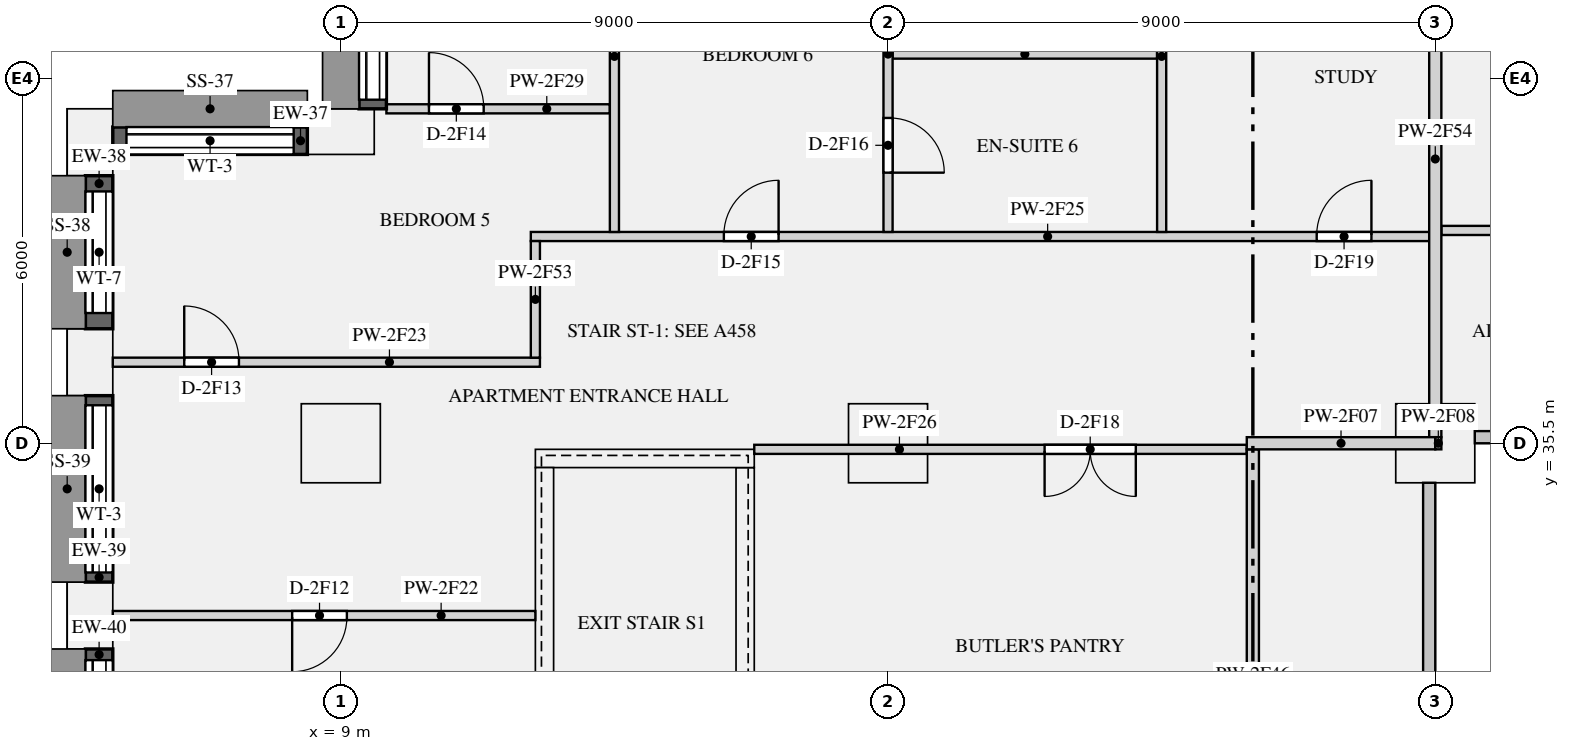
"""IFC4 building model, lengths in metres.
Left out: names, types, materials, properties, quantities, classifications, styles, units other than length and angle.
Written with IfcOpenShell. Run it as: python <this file> out.ifc"""

import sys

from ifc_helpers import new_model, si_unit, direction, frame, frame_2d, origin, origin_2d, place, context, subcontext, project, spatial, rectangle, extrude, element, fill, save


model = new_model("IFC4")
c1 = context("Model", 3, precision=1e-05, world=origin(), true_north=direction((0.0, 1.0)))
c2 = subcontext(c1, "Body", "Model", "MODEL_VIEW")
j1 = project(units=[si_unit("LENGTHUNIT", "METRE"), si_unit("PLANEANGLEUNIT", "RADIAN")], contexts=[c1])
p1 = place(None, origin())
s1 = spatial("IfcSite", under=j1, at=p1, CompositionType="ELEMENT")
p2 = place(p1, origin())
s2 = spatial("IfcBuilding", under=s1, at=p2, CompositionType="ELEMENT")
p3 = place(p2, frame((0.0, 0.0, 124.5)))
s3 = spatial("IfcBuildingStorey", under=s2, at=p3, CompositionType="ELEMENT", Elevation=124.5)
for number, where, z_axis, x_axis in (
    (1, (9.0, 40.625, 0.0), (0.0, 0.0, 1.0), (-1.0, 0.0, 0.0)),
    (2, (4.875, 40.45, 0.0), (0.0, 0.0, 1.0), (0.0, -1.0, 0.0)),
    (3, (4.875, 36.833, 0.0), (0.0, 0.0, 1.0), (0.0, -1.0, 0.0)),
    (4, (4.875, 32.667, 0.0), (0.0, 0.0, 1.0), (0.0, -1.0, 0.0)),
):
    element("IfcColumn", number, at=place(p3, frame(where, z_axis=z_axis, x_axis=x_axis)), inside=s3, PredefinedType="USERDEFINED", context=c2, shape_type="SweptSolid", body=[
        extrude(rectangle(XDim=1.1, YDim=0.75, at=origin_2d()), origin(), (0.0, 0.0, 1.0), 3.15),
    ])
for number, where, z_axis, x_axis in (
    (5, (9.0, 35.5, 0.0), (0.0, 0.0, 1.0), (1.0, 0.0, 0.0)),
    (6, (18.0, 35.5, 0.0), (0.0, 0.0, 1.0), (1.0, 0.0, 0.0)),
    (7, (27.0, 35.5, 0.0), (0.0, 0.0, 1.0), (1.0, 0.0, 0.0)),
):
    element("IfcColumn", number, at=place(p3, frame(where, z_axis=z_axis, x_axis=x_axis)), inside=s3, PredefinedType="COLUMN", context=c2, shape_type="SweptSolid", body=[
        extrude(rectangle(XDim=1.3, YDim=1.3, at=origin_2d()), origin(), (0.0, 0.0, 1.0), 3.15),
    ])
p4 = place(p3, frame((12.2, 35.25, 0.0), z_axis=(0.0, 0.0, 1.0), x_axis=(1.0, 0.0, 0.0)))
e8 = element("IfcWall", 8, at=p4, inside=s3, PredefinedType="SHEAR", context=c2, shape_type="SweptSolid", body=[
    extrude(rectangle(XDim=3.6, YDim=0.3, at=frame_2d((1.8, 0.0))), origin(), (0.0, 0.0, 1.0), 3.15),
])
for number, where, z_axis, x_axis in (
    (9, (12.35, 27.3, 0.0), (0.0, 0.0, 1.0), (0.0, 1.0, 0.0)),
    (10, (15.65, 27.3, 0.0), (0.0, 0.0, 1.0), (0.0, 1.0, 0.0)),
):
    element("IfcWall", number, at=place(p3, frame(where, z_axis=z_axis, x_axis=x_axis)), inside=s3, PredefinedType="SHEAR", context=c2, shape_type="SweptSolid", body=[
        extrude(rectangle(XDim=7.8, YDim=0.3, at=frame_2d((3.9, 0.0))), origin(), (0.0, 0.0, 1.0), 3.15),
    ])
p5 = place(p3, frame((9.525, 44.4, 0.9), z_axis=(0.0, 0.0, 1.0), x_axis=(0.0, -1.0, 0.0)))
e11 = element("IfcWall", 11, at=p5, inside=s3, PredefinedType="SOLIDWALL", context=c2, shape_type="SweptSolid", body=[
    extrude(rectangle(XDim=3.4, YDim=0.45, at=frame_2d((1.7, 0.0))), origin(), (0.0, 0.0, 1.0), 1.93),
])
p6 = place(p5, frame((0.15, 0.0, 0.15)))
e12 = element("IfcOpeningElement", 12, at=p6, cuts=e11, PredefinedType="OPENING", context=c2, shape_type="SweptSolid", body=[
    extrude(rectangle(XDim=3.1, YDim=1.5, at=frame_2d((1.55, 0.75))), frame((0.0, 0.235, 0.0), z_axis=(0.0, -1.0, 0.0), x_axis=(1.0, 0.0, 0.0)), (0.0, 0.0, 1.0), 0.47),
])
p7 = place(p3, frame((8.45, 40.475, 0.9), z_axis=(0.0, 0.0, 1.0), x_axis=(-1.0, 0.0, 0.0)))
e13 = element("IfcWall", 13, at=p7, inside=s3, PredefinedType="SOLIDWALL", context=c2, shape_type="SweptSolid", body=[
    extrude(rectangle(XDim=3.2, YDim=0.45, at=frame_2d((1.6, 0.0))), origin(), (0.0, 0.0, 1.0), 1.93),
])
p8 = place(p7, frame((0.225, 0.0, 0.15)))
e14 = element("IfcOpeningElement", 14, at=p8, cuts=e13, PredefinedType="OPENING", context=c2, shape_type="SweptSolid", body=[
    extrude(rectangle(XDim=2.75, YDim=1.5, at=frame_2d((1.375, 0.75))), frame((0.0, 0.235, 0.0), z_axis=(0.0, -1.0, 0.0), x_axis=(1.0, 0.0, 0.0)), (0.0, 0.0, 1.0), 0.47),
])
p9 = place(p3, frame((5.025, 39.9, 0.9), z_axis=(0.0, 0.0, 1.0), x_axis=(0.0, -1.0, 0.0)))
e15 = element("IfcWall", 15, at=p9, inside=s3, PredefinedType="SOLIDWALL", context=c2, shape_type="SweptSolid", body=[
    extrude(rectangle(XDim=2.517, YDim=0.45, at=frame_2d((1.258, 0.0))), origin(), (0.0, 0.0, 1.0), 1.93),
])
p10 = place(p9, frame((0.259, 0.0, 0.15)))
e16 = element("IfcOpeningElement", 16, at=p10, cuts=e15, PredefinedType="OPENING", context=c2, shape_type="SweptSolid", body=[
    extrude(rectangle(XDim=2.0, YDim=1.5, at=frame_2d((1.0, 0.75))), frame((0.0, 0.235, 0.0), z_axis=(0.0, -1.0, 0.0), x_axis=(1.0, 0.0, 0.0)), (0.0, 0.0, 1.0), 0.47),
])
p11 = place(p3, frame((5.025, 36.283, 0.9), z_axis=(0.0, 0.0, 1.0), x_axis=(0.0, -1.0, 0.0)))
e17 = element("IfcWall", 17, at=p11, inside=s3, PredefinedType="SOLIDWALL", context=c2, shape_type="SweptSolid", body=[
    extrude(rectangle(XDim=3.066, YDim=0.45, at=frame_2d((1.533, 0.0))), origin(), (0.0, 0.0, 1.0), 1.93),
])
p12 = place(p11, frame((0.158, 0.0, 0.15)))
e18 = element("IfcOpeningElement", 18, at=p12, cuts=e17, PredefinedType="OPENING", context=c2, shape_type="SweptSolid", body=[
    extrude(rectangle(XDim=2.75, YDim=1.5, at=frame_2d((1.375, 0.75))), frame((0.0, 0.235, 0.0), z_axis=(0.0, -1.0, 0.0), x_axis=(1.0, 0.0, 0.0)), (0.0, 0.0, 1.0), 0.47),
])
p13 = place(p3, frame((5.025, 32.117, 0.9), z_axis=(0.0, 0.0, 1.0), x_axis=(0.0, -1.0, 0.0)))
e19 = element("IfcWall", 19, at=p13, inside=s3, PredefinedType="SOLIDWALL", context=c2, shape_type="SweptSolid", body=[
    extrude(rectangle(XDim=2.867, YDim=0.45, at=frame_2d((1.434, 0.0))), origin(), (0.0, 0.0, 1.0), 1.93),
])
p14 = place(p13, frame((0.184, 0.0, 0.15)))
e20 = element("IfcOpeningElement", 20, at=p14, cuts=e19, PredefinedType="OPENING", context=c2, shape_type="SweptSolid", body=[
    extrude(rectangle(XDim=2.5, YDim=1.5, at=frame_2d((1.25, 0.75))), frame((0.0, 0.235, 0.0), z_axis=(0.0, -1.0, 0.0), x_axis=(1.0, 0.0, 0.0)), (0.0, 0.0, 1.0), 0.47),
])
p15 = place(p3, frame((23.9, 35.5, 0.0), z_axis=(0.0, 0.0, 1.0), x_axis=(1.0, 0.0, 0.0)))
e21 = element("IfcWall", 21, at=p15, inside=s3, PredefinedType="PARTITIONING", context=c2, shape_type="SweptSolid", body=[
    extrude(rectangle(XDim=3.1, YDim=0.2, at=frame_2d((1.55, 0.0))), origin(), (0.0, 0.0, 1.0), 2.83),
])
p16 = place(p3, frame((27.0, 35.5, 0.0), z_axis=(0.0, 0.0, 1.0), x_axis=(1.0, 0.0, 0.0)))
e22 = element("IfcWall", 22, at=p16, inside=s3, PredefinedType="PARTITIONING", context=c2, shape_type="SweptSolid", body=[
    extrude(rectangle(XDim=0.1, YDim=0.2, at=frame_2d((0.05, 0.0))), origin(), (0.0, 0.0, 1.0), 2.83),
])
p17 = place(p3, frame((5.25, 32.667, 0.0), z_axis=(0.0, 0.0, 1.0), x_axis=(1.0, 0.0, 0.0)))
e23 = element("IfcWall", 23, at=p17, inside=s3, PredefinedType="PARTITIONING", context=c2, shape_type="SweptSolid", body=[
    extrude(rectangle(XDim=6.95, YDim=0.15, at=frame_2d((3.475, 0.0))), origin(), (0.0, 0.0, 1.0), 2.83),
])
p18 = place(p17, frame((2.95, 0.0, 0.0)))
e24 = element("IfcOpeningElement", 24, at=p18, cuts=e23, PredefinedType="OPENING", context=c2, shape_type="SweptSolid", body=[
    extrude(rectangle(XDim=0.9, YDim=2.1, at=frame_2d((0.45, 1.05))), frame((0.0, 0.085, 0.0), z_axis=(0.0, -1.0, 0.0), x_axis=(1.0, 0.0, 0.0)), (0.0, 0.0, 1.0), 0.17),
])
p19 = place(p3, frame((5.25, 36.833, 0.0), z_axis=(0.0, 0.0, 1.0), x_axis=(1.0, 0.0, 0.0)))
e25 = element("IfcWall", 25, at=p19, inside=s3, PredefinedType="PARTITIONING", context=c2, shape_type="SweptSolid", body=[
    extrude(rectangle(XDim=7.025, YDim=0.15, at=frame_2d((3.512, 0.0))), origin(), (0.0, 0.0, 1.0), 2.83),
])
p20 = place(p19, frame((1.175, 0.0, 0.0)))
e26 = element("IfcOpeningElement", 26, at=p20, cuts=e25, PredefinedType="OPENING", context=c2, shape_type="SweptSolid", body=[
    extrude(rectangle(XDim=0.9, YDim=2.1, at=frame_2d((0.45, 1.05))), frame((0.0, 0.085, 0.0), z_axis=(0.0, -1.0, 0.0), x_axis=(1.0, 0.0, 0.0)), (0.0, 0.0, 1.0), 0.17),
])
p21 = place(p3, frame((12.125, 38.9, 0.0), z_axis=(0.0, 0.0, 1.0), x_axis=(1.0, 0.0, 0.0)))
e27 = element("IfcWall", 27, at=p21, inside=s3, PredefinedType="PARTITIONING", context=c2, shape_type="SweptSolid", body=[
    extrude(rectangle(XDim=14.775, YDim=0.15, at=frame_2d((7.387, 0.0))), origin(), (0.0, 0.0, 1.0), 2.83),
])
p22 = place(p21, frame((3.175, 0.0, 0.0)))
e28 = element("IfcOpeningElement", 28, at=p22, cuts=e27, PredefinedType="OPENING", context=c2, shape_type="SweptSolid", body=[
    extrude(rectangle(XDim=0.9, YDim=2.1, at=frame_2d((0.45, 1.05))), frame((0.0, 0.085, 0.0), z_axis=(0.0, -1.0, 0.0), x_axis=(1.0, 0.0, 0.0)), (0.0, 0.0, 1.0), 0.17),
])
p23 = place(p21, frame((12.925, 0.0, 0.0)))
e29 = element("IfcOpeningElement", 29, at=p23, cuts=e27, PredefinedType="OPENING", context=c2, shape_type="SweptSolid", body=[
    extrude(rectangle(XDim=0.9, YDim=2.1, at=frame_2d((0.45, 1.05))), frame((0.0, 0.085, 0.0), z_axis=(0.0, -1.0, 0.0), x_axis=(1.0, 0.0, 0.0)), (0.0, 0.0, 1.0), 0.17),
])
p24 = place(p3, frame((15.8, 35.4, 0.0), z_axis=(0.0, 0.0, 1.0), x_axis=(1.0, 0.0, 0.0)))
e30 = element("IfcWall", 30, at=p24, inside=s3, PredefinedType="PARTITIONING", context=c2, shape_type="SweptSolid", body=[
    extrude(rectangle(XDim=8.1, YDim=0.15, at=frame_2d((4.05, 0.0))), origin(), (0.0, 0.0, 1.0), 2.83),
])
p25 = place(p24, frame((4.775, 0.0, 0.0)))
e31 = element("IfcOpeningElement", 31, at=p25, cuts=e30, PredefinedType="OPENING", context=c2, shape_type="SweptSolid", body=[
    extrude(rectangle(XDim=1.5, YDim=2.1, at=frame_2d((0.75, 1.05))), frame((0.0, 0.085, 0.0), z_axis=(0.0, -1.0, 0.0), x_axis=(1.0, 0.0, 0.0)), (0.0, 0.0, 1.0), 0.17),
])
p26 = place(p3, frame((9.75, 41.0, 0.0), z_axis=(0.0, 0.0, 1.0), x_axis=(1.0, 0.0, 0.0)))
e32 = element("IfcWall", 32, at=p26, inside=s3, PredefinedType="PARTITIONING", context=c2, shape_type="SweptSolid", body=[
    extrude(rectangle(XDim=3.675, YDim=0.15, at=frame_2d((1.837, 0.0))), origin(), (0.0, 0.0, 1.0), 2.83),
])
p27 = place(p26, frame((0.7, 0.0, 0.0)))
e33 = element("IfcOpeningElement", 33, at=p27, cuts=e32, PredefinedType="OPENING", context=c2, shape_type="SweptSolid", body=[
    extrude(rectangle(XDim=0.9, YDim=2.1, at=frame_2d((0.45, 1.05))), frame((0.0, 0.085, 0.0), z_axis=(0.0, -1.0, 0.0), x_axis=(1.0, 0.0, 0.0)), (0.0, 0.0, 1.0), 0.17),
])
p28 = place(p3, frame((18.075, 41.9, 0.0), z_axis=(0.0, 0.0, 1.0), x_axis=(1.0, 0.0, 0.0)))
e34 = element("IfcWall", 34, at=p28, inside=s3, PredefinedType="PARTITIONING", context=c2, shape_type="SweptSolid", body=[
    extrude(rectangle(XDim=4.35, YDim=0.15, at=frame_2d((2.175, 0.0))), origin(), (0.0, 0.0, 1.0), 2.83),
])
p29 = place(p3, frame((27.1, 39.0, 0.0), z_axis=(0.0, 0.0, 1.0), x_axis=(1.0, 0.0, 0.0)))
e35 = element("IfcWall", 35, at=p29, inside=s3, PredefinedType="PARTITIONING", context=c2, shape_type="SweptSolid", body=[
    extrude(rectangle(XDim=22.475, YDim=0.15, at=frame_2d((11.237, 0.0))), origin(), (0.0, 0.0, 1.0), 2.83),
])
p30 = place(p29, frame((1.7, 0.0, 0.0)))
e36 = element("IfcOpeningElement", 36, at=p30, cuts=e35, PredefinedType="OPENING", context=c2, shape_type="SweptSolid", body=[
    extrude(rectangle(XDim=0.9, YDim=2.1, at=frame_2d((0.45, 1.05))), frame((0.0, 0.085, 0.0), z_axis=(0.0, -1.0, 0.0), x_axis=(1.0, 0.0, 0.0)), (0.0, 0.0, 1.0), 0.17),
])
p31 = place(p29, frame((6.2, 0.0, 0.0)))
e37 = element("IfcOpeningElement", 37, at=p31, cuts=e35, PredefinedType="OPENING", context=c2, shape_type="SweptSolid", body=[
    extrude(rectangle(XDim=0.9, YDim=2.1, at=frame_2d((0.45, 1.05))), frame((0.0, 0.085, 0.0), z_axis=(0.0, -1.0, 0.0), x_axis=(1.0, 0.0, 0.0)), (0.0, 0.0, 1.0), 0.17),
])
p32 = place(p29, frame((12.95, 0.0, 0.0)))
e38 = element("IfcOpeningElement", 38, at=p32, cuts=e35, PredefinedType="OPENING", context=c2, shape_type="SweptSolid", body=[
    extrude(rectangle(XDim=0.9, YDim=2.1, at=frame_2d((0.45, 1.05))), frame((0.0, 0.085, 0.0), z_axis=(0.0, -1.0, 0.0), x_axis=(1.0, 0.0, 0.0)), (0.0, 0.0, 1.0), 0.17),
])
p33 = place(p3, frame((18.0, 38.975, 0.0), z_axis=(0.0, 0.0, 1.0), x_axis=(0.0, 1.0, 0.0)))
e39 = element("IfcWall", 39, at=p33, inside=s3, PredefinedType="PARTITIONING", context=c2, shape_type="SweptSolid", body=[
    extrude(rectangle(XDim=5.775, YDim=0.15, at=frame_2d((2.887, 0.0))), origin(), (0.0, 0.0, 1.0), 2.83),
])
p34 = place(p33, frame((0.975, 0.0, 0.0)))
e40 = element("IfcOpeningElement", 40, at=p34, cuts=e39, PredefinedType="OPENING", context=c2, shape_type="SweptSolid", body=[
    extrude(rectangle(XDim=0.9, YDim=2.1, at=frame_2d((0.45, 1.05))), frame((0.0, 0.085, 0.0), z_axis=(0.0, -1.0, 0.0), x_axis=(1.0, 0.0, 0.0)), (0.0, 0.0, 1.0), 0.17),
])
p35 = place(p33, frame((3.975, 0.0, 0.0)))
e41 = element("IfcOpeningElement", 41, at=p35, cuts=e39, PredefinedType="OPENING", context=c2, shape_type="SweptSolid", body=[
    extrude(rectangle(XDim=0.9, YDim=2.1, at=frame_2d((0.45, 1.05))), frame((0.0, 0.085, 0.0), z_axis=(0.0, -1.0, 0.0), x_axis=(1.0, 0.0, 0.0)), (0.0, 0.0, 1.0), 0.17),
])
p36 = place(p3, frame((24.0, 27.1, 0.0), z_axis=(0.0, 0.0, 1.0), x_axis=(0.0, 1.0, 0.0)))
e42 = element("IfcWall", 42, at=p36, inside=s3, PredefinedType="PARTITIONING", context=c2, shape_type="SweptSolid", body=[
    extrude(rectangle(XDim=8.3, YDim=0.2, at=frame_2d((4.15, 0.0))), origin(), (0.0, 0.0, 1.0), 2.83),
])
p37 = place(p3, frame((13.5, 38.975, 0.0), z_axis=(0.0, 0.0, 1.0), x_axis=(0.0, 1.0, 0.0)))
e43 = element("IfcWall", 43, at=p37, inside=s3, PredefinedType="PARTITIONING", context=c2, shape_type="SweptSolid", body=[
    extrude(rectangle(XDim=5.775, YDim=0.15, at=frame_2d((2.887, 0.0))), origin(), (0.0, 0.0, 1.0), 2.83),
])
p38 = place(p3, frame((12.2, 36.908, 0.0), z_axis=(0.0, 0.0, 1.0), x_axis=(0.0, 1.0, 0.0)))
e44 = element("IfcWall", 44, at=p38, inside=s3, PredefinedType="PARTITIONING", context=c2, shape_type="SweptSolid", body=[
    extrude(rectangle(XDim=1.917, YDim=0.15, at=frame_2d((0.958, 0.0))), origin(), (0.0, 0.0, 1.0), 2.83),
])
p39 = place(p3, frame((27.0, 35.6, 0.0), z_axis=(0.0, 0.0, 1.0), x_axis=(0.0, 1.0, 0.0)))
e45 = element("IfcWall", 45, at=p39, inside=s3, PredefinedType="PARTITIONING", context=c2, shape_type="SweptSolid", body=[
    extrude(rectangle(XDim=9.15, YDim=0.2, at=frame_2d((4.575, 0.0))), origin(), (0.0, 0.0, 1.0), 2.83),
])
p40 = place(p3, frame((22.5, 38.975, 0.0), z_axis=(0.0, 0.0, 1.0), x_axis=(0.0, 1.0, 0.0)))
e46 = element("IfcWall", 46, at=p40, inside=s3, PredefinedType="PARTITIONING", context=c2, shape_type="SweptSolid", body=[
    extrude(rectangle(XDim=5.775, YDim=0.15, at=frame_2d((2.887, 0.0))), origin(), (0.0, 0.0, 1.0), 2.83),
])
p41 = place(p6, origin())
e47 = element("IfcWindow", 47, at=p41, inside=s3, PartitioningType="SINGLE_PANEL", PredefinedType="WINDOW", context=c2, shape_type="SweptSolid", body=[
    extrude(rectangle(XDim=3.1, YDim=1.5, at=frame_2d((1.55, 0.75))), frame((0.0, -0.065, 0.0), z_axis=(0.0, -1.0, 0.0), x_axis=(1.0, 0.0, 0.0)), (0.0, 0.0, 1.0), 0.06),
])
fill(e12, e47)
p42 = place(p8, origin())
e48 = element("IfcWindow", 48, at=p42, inside=s3, PartitioningType="SINGLE_PANEL", PredefinedType="WINDOW", context=c2, shape_type="SweptSolid", body=[
    extrude(rectangle(XDim=2.75, YDim=1.5, at=frame_2d((1.375, 0.75))), frame((0.0, -0.065, 0.0), z_axis=(0.0, -1.0, 0.0), x_axis=(1.0, 0.0, 0.0)), (0.0, 0.0, 1.0), 0.06),
])
fill(e14, e48)
p43 = place(p10, origin())
e49 = element("IfcWindow", 49, at=p43, inside=s3, PartitioningType="SINGLE_PANEL", PredefinedType="WINDOW", context=c2, shape_type="SweptSolid", body=[
    extrude(rectangle(XDim=2.0, YDim=1.5, at=frame_2d((1.0, 0.75))), frame((0.0, -0.065, 0.0), z_axis=(0.0, -1.0, 0.0), x_axis=(1.0, 0.0, 0.0)), (0.0, 0.0, 1.0), 0.06),
])
fill(e16, e49)
p44 = place(p12, origin())
e50 = element("IfcWindow", 50, at=p44, inside=s3, PartitioningType="SINGLE_PANEL", PredefinedType="WINDOW", context=c2, shape_type="SweptSolid", body=[
    extrude(rectangle(XDim=2.75, YDim=1.5, at=frame_2d((1.375, 0.75))), frame((0.0, -0.065, 0.0), z_axis=(0.0, -1.0, 0.0), x_axis=(1.0, 0.0, 0.0)), (0.0, 0.0, 1.0), 0.06),
])
fill(e18, e50)
p45 = place(p14, origin())
e51 = element("IfcWindow", 51, at=p45, inside=s3, PartitioningType="SINGLE_PANEL", PredefinedType="WINDOW", context=c2, shape_type="SweptSolid", body=[
    extrude(rectangle(XDim=2.5, YDim=1.5, at=frame_2d((1.25, 0.75))), frame((0.0, -0.065, 0.0), z_axis=(0.0, -1.0, 0.0), x_axis=(1.0, 0.0, 0.0)), (0.0, 0.0, 1.0), 0.06),
])
fill(e20, e51)
p46 = place(p18, frame((0.9, 0.0, 0.0), z_axis=(0.0, 0.0, 1.0), x_axis=(-1.0, 0.0, 0.0)))
e52 = element("IfcDoor", 52, at=p46, inside=s3, OperationType="SINGLE_SWING_RIGHT", PredefinedType="DOOR", context=c2, shape_type="SweptSolid", body=[
    extrude(rectangle(XDim=0.9, YDim=2.1, at=frame_2d((0.45, 1.05))), frame((0.0, 0.025, 0.0), z_axis=(0.0, -1.0, 0.0), x_axis=(1.0, 0.0, 0.0)), (0.0, 0.0, 1.0), 0.05),
])
fill(e24, e52)
p47 = place(p20, origin())
e53 = element("IfcDoor", 53, at=p47, inside=s3, OperationType="SINGLE_SWING_LEFT", PredefinedType="DOOR", context=c2, shape_type="SweptSolid", body=[
    extrude(rectangle(XDim=0.9, YDim=2.1, at=frame_2d((0.45, 1.05))), frame((0.0, 0.025, 0.0), z_axis=(0.0, -1.0, 0.0), x_axis=(1.0, 0.0, 0.0)), (0.0, 0.0, 1.0), 0.05),
])
fill(e26, e53)
p48 = place(p27, origin())
e54 = element("IfcDoor", 54, at=p48, inside=s3, OperationType="SINGLE_SWING_LEFT", PredefinedType="DOOR", context=c2, shape_type="SweptSolid", body=[
    extrude(rectangle(XDim=0.9, YDim=2.1, at=frame_2d((0.45, 1.05))), frame((0.0, 0.025, 0.0), z_axis=(0.0, -1.0, 0.0), x_axis=(1.0, 0.0, 0.0)), (0.0, 0.0, 1.0), 0.05),
])
fill(e33, e54)
p49 = place(p22, origin())
e55 = element("IfcDoor", 55, at=p49, inside=s3, OperationType="SINGLE_SWING_RIGHT", PredefinedType="DOOR", context=c2, shape_type="SweptSolid", body=[
    extrude(rectangle(XDim=0.9, YDim=2.1, at=frame_2d((0.45, 1.05))), frame((0.0, 0.025, 0.0), z_axis=(0.0, -1.0, 0.0), x_axis=(1.0, 0.0, 0.0)), (0.0, 0.0, 1.0), 0.05),
])
fill(e28, e55)
p50 = place(p34, frame((0.9, 0.0, 0.0), z_axis=(0.0, 0.0, 1.0), x_axis=(-1.0, 0.0, 0.0)))
e56 = element("IfcDoor", 56, at=p50, inside=s3, OperationType="SINGLE_SWING_RIGHT", PredefinedType="DOOR", context=c2, shape_type="SweptSolid", body=[
    extrude(rectangle(XDim=0.9, YDim=2.1, at=frame_2d((0.45, 1.05))), frame((0.0, 0.025, 0.0), z_axis=(0.0, -1.0, 0.0), x_axis=(1.0, 0.0, 0.0)), (0.0, 0.0, 1.0), 0.05),
])
fill(e40, e56)
p51 = place(p25, frame((1.5, 0.0, 0.0), z_axis=(0.0, 0.0, 1.0), x_axis=(-1.0, 0.0, 0.0)))
e57 = element("IfcDoor", 57, at=p51, inside=s3, OperationType="DOUBLE_DOOR_SINGLE_SWING", PredefinedType="DOOR", context=c2, shape_type="SweptSolid", body=[
    extrude(rectangle(XDim=1.5, YDim=2.1, at=frame_2d((0.75, 1.05))), frame((0.0, 0.025, 0.0), z_axis=(0.0, -1.0, 0.0), x_axis=(1.0, 0.0, 0.0)), (0.0, 0.0, 1.0), 0.05),
])
fill(e31, e57)
p52 = place(p23, origin())
e58 = element("IfcDoor", 58, at=p52, inside=s3, OperationType="SINGLE_SWING_RIGHT", PredefinedType="DOOR", context=c2, shape_type="SweptSolid", body=[
    extrude(rectangle(XDim=0.9, YDim=2.1, at=frame_2d((0.45, 1.05))), frame((0.0, 0.025, 0.0), z_axis=(0.0, -1.0, 0.0), x_axis=(1.0, 0.0, 0.0)), (0.0, 0.0, 1.0), 0.05),
])
fill(e29, e58)
save(model, sys.argv[1])
